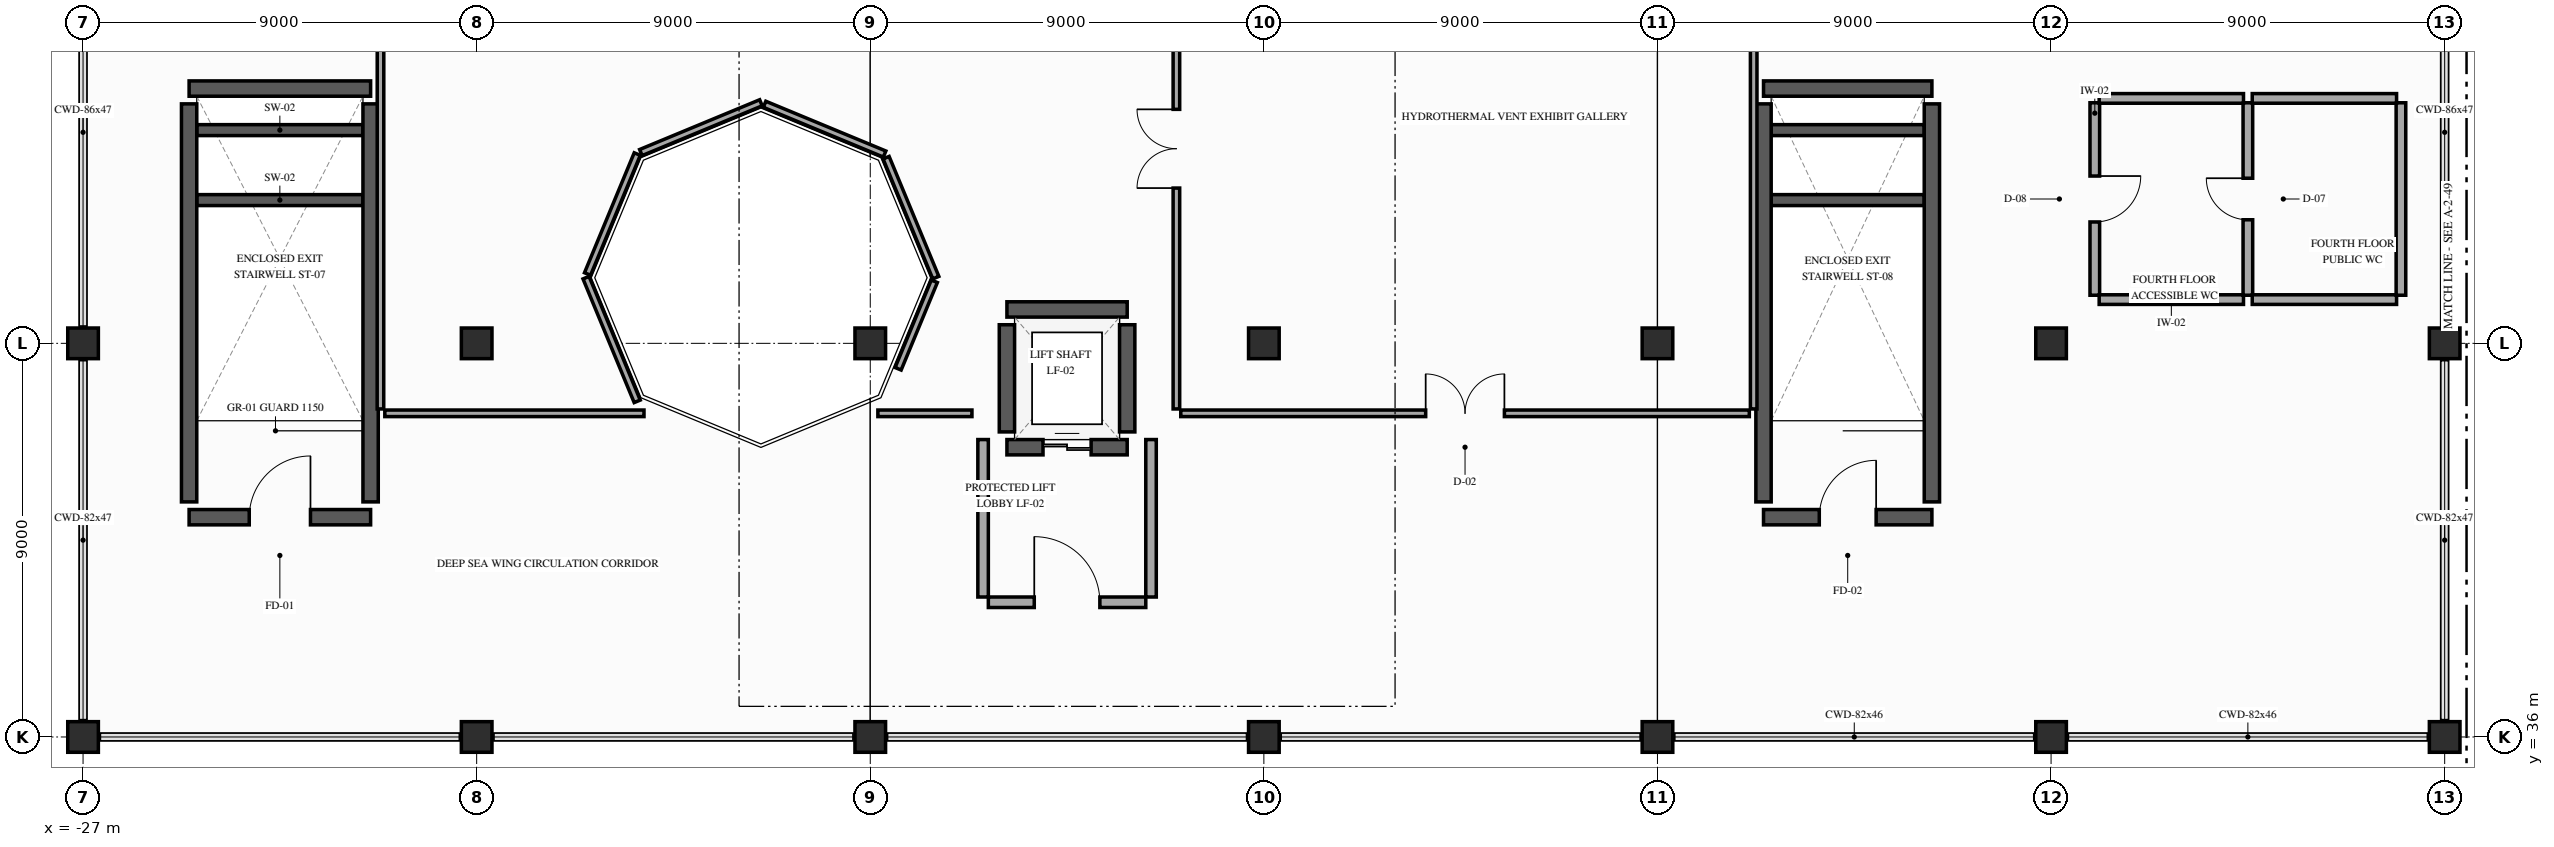
"""IFC4 building model, lengths in metres.
Left out: names, types, materials, properties, quantities, classifications, styles, units other than length and angle.
Written with IfcOpenShell. Run it as: python <this file> out.ifc"""

import sys

from ifc_helpers import new_model, si_unit, direction, frame, frame_2d, origin, origin_2d, place, context, subcontext, project, spatial, rectangle, extrude, element, fill, save


model = new_model("IFC4")
c1 = context("Model", 3, precision=1e-05, world=origin(), true_north=direction((0.0, 1.0)))
c2 = subcontext(c1, "Body", "Model", "MODEL_VIEW")
j1 = project(units=[si_unit("LENGTHUNIT", "METRE"), si_unit("PLANEANGLEUNIT", "RADIAN")], contexts=[c1])
p1 = place(None, origin())
s1 = spatial("IfcSite", under=j1, at=p1, CompositionType="ELEMENT")
p2 = place(p1, origin())
s2 = spatial("IfcBuilding", under=s1, at=p2, CompositionType="ELEMENT")
p3 = place(p2, frame((0.0, 0.0, 21.6)))
s3 = spatial("IfcBuildingStorey", under=s2, at=p3, CompositionType="ELEMENT", Elevation=21.6)
for number, where, z_axis, x_axis in (
    (1, (-27.0, 36.0, 0.0), (0.0, 0.0, 1.0), (1.0, 0.0, 0.0)),
    (2, (-27.0, 45.0, 0.0), (0.0, 0.0, 1.0), (1.0, 0.0, 0.0)),
    (3, (-18.0, 36.0, 0.0), (0.0, 0.0, 1.0), (1.0, 0.0, 0.0)),
    (4, (-18.0, 45.0, 0.0), (0.0, 0.0, 1.0), (1.0, 0.0, 0.0)),
    (5, (-9.0, 36.0, 0.0), (0.0, 0.0, 1.0), (1.0, 0.0, 0.0)),
    (6, (-9.0, 45.0, 0.0), (0.0, 0.0, 1.0), (1.0, 0.0, 0.0)),
    (7, (0.0, 36.0, 0.0), (0.0, 0.0, 1.0), (1.0, 0.0, 0.0)),
    (8, (0.0, 45.0, 0.0), (0.0, 0.0, 1.0), (1.0, 0.0, 0.0)),
    (9, (9.0, 36.0, 0.0), (0.0, 0.0, 1.0), (1.0, 0.0, 0.0)),
    (10, (9.0, 45.0, 0.0), (0.0, 0.0, 1.0), (1.0, 0.0, 0.0)),
    (11, (18.0, 36.0, 0.0), (0.0, 0.0, 1.0), (1.0, 0.0, 0.0)),
    (12, (18.0, 45.0, 0.0), (0.0, 0.0, 1.0), (1.0, 0.0, 0.0)),
    (13, (27.0, 36.0, 0.0), (0.0, 0.0, 1.0), (1.0, 0.0, 0.0)),
    (14, (27.0, 45.0, 0.0), (0.0, 0.0, 1.0), (1.0, 0.0, 0.0)),
):
    element("IfcColumn", number, at=place(p3, frame(where, z_axis=z_axis, x_axis=x_axis)), inside=s3, PredefinedType="COLUMN", context=c2, shape_type="SweptSolid", body=[
        extrude(rectangle(XDim=0.7, YDim=0.7, at=origin_2d()), origin(), (0.0, 0.0, 1.0), 5.4),
    ])
for number, where, z_axis, x_axis in (
    (15, (-24.4, 48.275, 0.0), (0.0, 0.0, 1.0), (1.0, 0.0, 0.0)),
    (16, (-24.4, 49.875, 0.0), (0.0, 0.0, 1.0), (1.0, 0.0, 0.0)),
):
    element("IfcWall", number, at=place(p3, frame(where, z_axis=z_axis, x_axis=x_axis)), inside=s3, PredefinedType="SHEAR", context=c2, shape_type="SweptSolid", body=[
        extrude(rectangle(XDim=3.8, YDim=0.25, at=frame_2d((1.9, 0.0))), origin(), (0.0, 0.0, 1.0), 2.5),
    ])
p4 = place(p3, frame((-24.575, 41.025, 0.0), z_axis=(0.0, 0.0, 1.0), x_axis=(1.0, 0.0, 0.0)))
e17 = element("IfcWall", 17, at=p4, inside=s3, PredefinedType="SHEAR", context=c2, shape_type="SweptSolid", body=[
    extrude(rectangle(XDim=4.15, YDim=0.35, at=frame_2d((2.075, 0.0))), origin(), (0.0, 0.0, 1.0), 5.15),
])
p5 = place(p4, frame((1.375, 0.0, 0.0)))
e18 = element("IfcOpeningElement", 18, at=p5, cuts=e17, PredefinedType="OPENING", context=c2, shape_type="SweptSolid", body=[
    extrude(rectangle(XDim=1.4, YDim=2.2, at=frame_2d((0.7, 1.1))), frame((0.0, 0.185, 0.0), z_axis=(0.0, -1.0, 0.0), x_axis=(1.0, 0.0, 0.0)), (0.0, 0.0, 1.0), 0.37),
])
p6 = place(p3, frame((-24.575, 50.825, 0.0), z_axis=(0.0, 0.0, 1.0), x_axis=(1.0, 0.0, 0.0)))
e19 = element("IfcWall", 19, at=p6, inside=s3, PredefinedType="SHEAR", context=c2, shape_type="SweptSolid", body=[
    extrude(rectangle(XDim=4.15, YDim=0.35, at=frame_2d((2.075, 0.0))), origin(), (0.0, 0.0, 1.0), 5.15),
])
for number, where, z_axis, x_axis in (
    (20, (-24.575, 41.375, 0.0), (0.0, 0.0, 1.0), (0.0, 1.0, 0.0)),
    (21, (-20.425, 41.375, 0.0), (0.0, 0.0, 1.0), (0.0, 1.0, 0.0)),
):
    element("IfcWall", number, at=place(p3, frame(where, z_axis=z_axis, x_axis=x_axis)), inside=s3, PredefinedType="SHEAR", context=c2, shape_type="SweptSolid", body=[
        extrude(rectangle(XDim=9.1, YDim=0.35, at=frame_2d((4.55, 0.0))), origin(), (0.0, 0.0, 1.0), 5.15),
    ])
for number, where, z_axis, x_axis in (
    (22, (11.6, 48.275, 0.0), (0.0, 0.0, 1.0), (1.0, 0.0, 0.0)),
    (23, (11.6, 49.875, 0.0), (0.0, 0.0, 1.0), (1.0, 0.0, 0.0)),
):
    element("IfcWall", number, at=place(p3, frame(where, z_axis=z_axis, x_axis=x_axis)), inside=s3, PredefinedType="SHEAR", context=c2, shape_type="SweptSolid", body=[
        extrude(rectangle(XDim=3.5, YDim=0.25, at=frame_2d((1.75, 0.0))), origin(), (0.0, 0.0, 1.0), 2.5),
    ])
p7 = place(p3, frame((11.425, 41.025, 0.0), z_axis=(0.0, 0.0, 1.0), x_axis=(1.0, 0.0, 0.0)))
e24 = element("IfcWall", 24, at=p7, inside=s3, PredefinedType="SHEAR", context=c2, shape_type="SweptSolid", body=[
    extrude(rectangle(XDim=3.85, YDim=0.35, at=frame_2d((1.925, 0.0))), origin(), (0.0, 0.0, 1.0), 5.15),
])
p8 = place(p7, frame((1.275, 0.0, 0.0)))
e25 = element("IfcOpeningElement", 25, at=p8, cuts=e24, PredefinedType="OPENING", context=c2, shape_type="SweptSolid", body=[
    extrude(rectangle(XDim=1.3, YDim=2.2, at=frame_2d((0.65, 1.1))), frame((0.0, 0.185, 0.0), z_axis=(0.0, -1.0, 0.0), x_axis=(1.0, 0.0, 0.0)), (0.0, 0.0, 1.0), 0.37),
])
p9 = place(p3, frame((11.425, 50.825, 0.0), z_axis=(0.0, 0.0, 1.0), x_axis=(1.0, 0.0, 0.0)))
e26 = element("IfcWall", 26, at=p9, inside=s3, PredefinedType="SHEAR", context=c2, shape_type="SweptSolid", body=[
    extrude(rectangle(XDim=3.85, YDim=0.35, at=frame_2d((1.925, 0.0))), origin(), (0.0, 0.0, 1.0), 5.15),
])
for number, where, z_axis, x_axis in (
    (27, (11.425, 41.375, 0.0), (0.0, 0.0, 1.0), (0.0, 1.0, 0.0)),
    (28, (15.275, 41.375, 0.0), (0.0, 0.0, 1.0), (0.0, 1.0, 0.0)),
):
    element("IfcWall", number, at=place(p3, frame(where, z_axis=z_axis, x_axis=x_axis)), inside=s3, PredefinedType="SHEAR", context=c2, shape_type="SweptSolid", body=[
        extrude(rectangle(XDim=9.1, YDim=0.35, at=frame_2d((4.55, 0.0))), origin(), (0.0, 0.0, 1.0), 5.15),
    ])
p10 = place(p3, frame((-5.875, 42.625, 0.0), z_axis=(0.0, 0.0, 1.0), x_axis=(1.0, 0.0, 0.0)))
e29 = element("IfcWall", 29, at=p10, inside=s3, PredefinedType="SHEAR", context=c2, shape_type="SweptSolid", body=[
    extrude(rectangle(XDim=2.75, YDim=0.35, at=frame_2d((1.375, 0.0))), origin(), (0.0, 0.0, 1.0), 5.15),
])
p11 = place(p10, frame((0.825, 0.0, 0.0)))
e30 = element("IfcOpeningElement", 30, at=p11, cuts=e29, PredefinedType="OPENING", context=c2, shape_type="SweptSolid", body=[
    extrude(rectangle(XDim=1.1, YDim=2.2, at=frame_2d((0.55, 1.1))), frame((0.0, 0.185, 0.0), z_axis=(0.0, -1.0, 0.0), x_axis=(1.0, 0.0, 0.0)), (0.0, 0.0, 1.0), 0.37),
])
p12 = place(p3, frame((-3.125, 45.775, 0.0), z_axis=(0.0, 0.0, 1.0), x_axis=(-1.0, 0.0, 0.0)))
e31 = element("IfcWall", 31, at=p12, inside=s3, PredefinedType="SHEAR", context=c2, shape_type="SweptSolid", body=[
    extrude(rectangle(XDim=2.75, YDim=0.35, at=frame_2d((1.375, 0.0))), origin(), (0.0, 0.0, 1.0), 5.15),
])
for number, where, z_axis, x_axis in (
    (32, (-5.875, 42.975, 0.0), (0.0, 0.0, 1.0), (0.0, 1.0, 0.0)),
    (33, (-3.125, 42.975, 0.0), (0.0, 0.0, 1.0), (0.0, 1.0, 0.0)),
):
    element("IfcWall", number, at=place(p3, frame(where, z_axis=z_axis, x_axis=x_axis)), inside=s3, PredefinedType="SHEAR", context=c2, shape_type="SweptSolid", body=[
        extrude(rectangle(XDim=2.45, YDim=0.35, at=frame_2d((1.225, 0.0))), origin(), (0.0, 0.0, 1.0), 5.15),
    ])
p13 = place(p3, frame((-6.3, 39.08, 0.0), z_axis=(0.0, 0.0, 1.0), x_axis=(1.0, 0.0, 0.0)))
e34 = element("IfcWall", 34, at=p13, inside=s3, PredefinedType="PARTITIONING", context=c2, shape_type="SweptSolid", body=[
    extrude(rectangle(XDim=3.6, YDim=0.24, at=frame_2d((1.8, 0.0))), origin(), (0.0, 0.0, 1.0), 5.1),
])
p14 = place(p13, frame((1.05, 0.0, 0.0)))
e35 = element("IfcOpeningElement", 35, at=p14, cuts=e34, PredefinedType="OPENING", context=c2, shape_type="SweptSolid", body=[
    extrude(rectangle(XDim=1.5, YDim=2.2, at=frame_2d((0.75, 1.1))), frame((0.0, 0.13, 0.0), z_axis=(0.0, -1.0, 0.0), x_axis=(1.0, 0.0, 0.0)), (0.0, 0.0, 1.0), 0.26),
])
for number, where, z_axis, x_axis in (
    (36, (-6.42, 39.2, 0.0), (0.0, 0.0, 1.0), (0.0, 1.0, 0.0)),
    (37, (-2.58, 39.2, 0.0), (0.0, 0.0, 1.0), (0.0, 1.0, 0.0)),
):
    element("IfcWall", number, at=place(p3, frame(where, z_axis=z_axis, x_axis=x_axis)), inside=s3, PredefinedType="PARTITIONING", context=c2, shape_type="SweptSolid", body=[
        extrude(rectangle(XDim=3.6, YDim=0.24, at=frame_2d((1.8, 0.0))), origin(), (0.0, 0.0, 1.0), 5.1),
    ])
p15 = place(p3, frame((19.0, 50.5, 0.0), z_axis=(0.0, 0.0, 1.0), x_axis=(0.0, -1.0, 0.0)))
e38 = element("IfcWall", 38, at=p15, inside=s3, PredefinedType="PLUMBINGWALL", context=c2, shape_type="SweptSolid", body=[
    extrude(rectangle(XDim=4.4, YDim=0.22, at=frame_2d((2.2, 0.0))), origin(), (0.0, 0.0, 1.0), 5.05),
])
p16 = place(p15, frame((1.675, 0.0, 0.0)))
e39 = element("IfcOpeningElement", 39, at=p16, cuts=e38, PredefinedType="OPENING", context=c2, shape_type="SweptSolid", body=[
    extrude(rectangle(XDim=1.05, YDim=2.15, at=frame_2d((0.525, 1.075))), frame((0.0, 0.12, 0.0), z_axis=(0.0, -1.0, 0.0), x_axis=(1.0, 0.0, 0.0)), (0.0, 0.0, 1.0), 0.24),
])
p17 = place(p3, frame((19.1, 46.0, 0.0), z_axis=(0.0, 0.0, 1.0), x_axis=(1.0, 0.0, 0.0)))
e40 = element("IfcWall", 40, at=p17, inside=s3, PredefinedType="PLUMBINGWALL", context=c2, shape_type="SweptSolid", body=[
    extrude(rectangle(XDim=3.3, YDim=0.22, at=frame_2d((1.65, 0.0))), origin(), (0.0, 0.0, 1.0), 5.05),
])
p18 = place(p3, frame((22.5, 46.1, 0.0), z_axis=(0.0, 0.0, 1.0), x_axis=(0.0, 1.0, 0.0)))
e41 = element("IfcWall", 41, at=p18, inside=s3, PredefinedType="PLUMBINGWALL", context=c2, shape_type="SweptSolid", body=[
    extrude(rectangle(XDim=4.4, YDim=0.22, at=frame_2d((2.2, 0.0))), origin(), (0.0, 0.0, 1.0), 5.05),
])
p19 = place(p18, frame((1.725, 0.0, 0.0)))
e42 = element("IfcOpeningElement", 42, at=p19, cuts=e41, PredefinedType="OPENING", context=c2, shape_type="SweptSolid", body=[
    extrude(rectangle(XDim=0.95, YDim=2.15, at=frame_2d((0.475, 1.075))), frame((0.0, 0.12, 0.0), z_axis=(0.0, -1.0, 0.0), x_axis=(1.0, 0.0, 0.0)), (0.0, 0.0, 1.0), 0.24),
])
for number, where, z_axis, x_axis in (
    (43, (22.4, 50.6, 0.0), (0.0, 0.0, 1.0), (-1.0, 0.0, 0.0)),
    (44, (22.6, 46.0, 0.0), (0.0, 0.0, 1.0), (1.0, 0.0, 0.0)),
):
    element("IfcWall", number, at=place(p3, frame(where, z_axis=z_axis, x_axis=x_axis)), inside=s3, PredefinedType="PLUMBINGWALL", context=c2, shape_type="SweptSolid", body=[
        extrude(rectangle(XDim=3.3, YDim=0.22, at=frame_2d((1.65, 0.0))), origin(), (0.0, 0.0, 1.0), 5.05),
    ])
p20 = place(p3, frame((26.0, 46.1, 0.0), z_axis=(0.0, 0.0, 1.0), x_axis=(0.0, 1.0, 0.0)))
e45 = element("IfcWall", 45, at=p20, inside=s3, PredefinedType="PLUMBINGWALL", context=c2, shape_type="SweptSolid", body=[
    extrude(rectangle(XDim=4.4, YDim=0.22, at=frame_2d((2.2, 0.0))), origin(), (0.0, 0.0, 1.0), 5.05),
])
p21 = place(p3, frame((25.9, 50.6, 0.0), z_axis=(0.0, 0.0, 1.0), x_axis=(-1.0, 0.0, 0.0)))
e46 = element("IfcWall", 46, at=p21, inside=s3, PredefinedType="PLUMBINGWALL", context=c2, shape_type="SweptSolid", body=[
    extrude(rectangle(XDim=3.3, YDim=0.22, at=frame_2d((1.65, 0.0))), origin(), (0.0, 0.0, 1.0), 5.05),
])
p22 = place(p3, frame((-20.198, 53.62, 0.0), z_axis=(0.0, 0.0, 1.0), x_axis=(-0.000192994303, -0.999999981377, 0.0)))
e47 = element("IfcWall", 47, at=p22, inside=s3, PredefinedType="PARTITIONING", context=c2, shape_type="SweptSolid", body=[
    extrude(rectangle(XDim=10.12, YDim=0.15, at=frame_2d((5.06, 0.0))), origin(), (0.0, 0.0, 1.0), 5.05),
])
p23 = place(p3, frame((-20.1, 43.4, 0.0), z_axis=(0.0, 0.0, 1.0), x_axis=(1.0, 0.0, 0.0)))
e48 = element("IfcWall", 48, at=p23, inside=s3, PredefinedType="PARTITIONING", context=c2, shape_type="SweptSolid", body=[
    extrude(rectangle(XDim=5.926, YDim=0.15, at=frame_2d((2.963, 0.0))), origin(), (0.0, 0.0, 1.0), 4.685),
])
p24 = place(p3, frame((-14.329, 43.674, 0.0), z_axis=(0.0, 0.0, 1.0), x_axis=(-0.382286027274, 0.924044042971, 0.0)))
e49 = element("IfcWall", 49, at=p24, inside=s3, PredefinedType="PARTITIONING", context=c2, shape_type="SweptSolid", body=[
    extrude(rectangle(XDim=3.06, YDim=0.15, at=frame_2d((1.53, 0.0))), origin(), (0.0, 0.0, 1.0), 4.635),
])
p25 = place(p3, frame((-15.465, 46.585, 0.0), z_axis=(0.0, 0.0, 1.0), x_axis=(0.382985932097, 0.923754174992, 0.0)))
e50 = element("IfcWall", 50, at=p25, inside=s3, PredefinedType="PARTITIONING", context=c2, shape_type="SweptSolid", body=[
    extrude(rectangle(XDim=2.969, YDim=0.15, at=frame_2d((1.485, 0.0))), origin(), (0.0, 0.0, 1.0), 5.05),
])
p26 = place(p3, frame((-14.245, 49.362, 0.0), z_axis=(0.0, 0.0, 1.0), x_axis=(0.923775431697, 0.382934657341, 0.0)))
e51 = element("IfcWall", 51, at=p26, inside=s3, PredefinedType="PARTITIONING", context=c2, shape_type="SweptSolid", body=[
    extrude(rectangle(XDim=2.972, YDim=0.15, at=frame_2d((1.486, 0.0))), origin(), (0.0, 0.0, 1.0), 5.05),
])
p27 = place(p3, frame((-11.417, 50.466, 0.0), z_axis=(0.0, 0.0, 1.0), x_axis=(0.923734314356, -0.383033832031, 0.0)))
e52 = element("IfcWall", 52, at=p27, inside=s3, PredefinedType="PARTITIONING", context=c2, shape_type="SweptSolid", body=[
    extrude(rectangle(XDim=2.971, YDim=0.15, at=frame_2d((1.486, 0.0))), origin(), (0.0, 0.0, 1.0), 4.685),
])
p28 = place(p3, frame((-8.638, 49.245, 0.0), z_axis=(0.0, 0.0, 1.0), x_axis=(0.382886684653, -0.923795316461, 0.0)))
e53 = element("IfcWall", 53, at=p28, inside=s3, PredefinedType="PARTITIONING", context=c2, shape_type="SweptSolid", body=[
    extrude(rectangle(XDim=2.969, YDim=0.15, at=frame_2d((1.485, 0.0))), origin(), (0.0, 0.0, 1.0), 4.685),
])
p29 = place(p3, frame((-7.535, 46.419, 0.0), z_axis=(0.0, 0.0, 1.0), x_axis=(-0.382404898799, -0.923994855708, 0.0)))
e54 = element("IfcWall", 54, at=p29, inside=s3, PredefinedType="PARTITIONING", context=c2, shape_type="SweptSolid", body=[
    extrude(rectangle(XDim=2.166, YDim=0.15, at=frame_2d((1.083, 0.0))), origin(), (0.0, 0.0, 1.0), 5.05),
])
p30 = place(p3, frame((-8.826, 43.4, 0.0), z_axis=(0.0, 0.0, 1.0), x_axis=(1.0, 0.0, 0.0)))
e55 = element("IfcWall", 55, at=p30, inside=s3, PredefinedType="PARTITIONING", context=c2, shape_type="SweptSolid", body=[
    extrude(rectangle(XDim=2.151, YDim=0.15, at=frame_2d((1.075, 0.0))), origin(), (0.0, 0.0, 1.0), 4.685),
])
p31 = place(p3, frame((-2.0, 43.5, 0.0), z_axis=(0.0, 0.0, 1.0), x_axis=(0.0, 1.0, 0.0)))
e56 = element("IfcWall", 56, at=p31, inside=s3, PredefinedType="PARTITIONING", context=c2, shape_type="SweptSolid", body=[
    extrude(rectangle(XDim=11.9, YDim=0.15, at=frame_2d((5.95, 0.0))), origin(), (0.0, 0.0, 1.0), 4.635),
])
p32 = place(p31, frame((5.05, 0.0, 0.0)))
e57 = element("IfcOpeningElement", 57, at=p32, cuts=e56, PredefinedType="OPENING", context=c2, shape_type="SweptSolid", body=[
    extrude(rectangle(XDim=1.8, YDim=2.3, at=frame_2d((0.9, 1.15))), frame((0.0, 0.085, 0.0), z_axis=(0.0, -1.0, 0.0), x_axis=(1.0, 0.0, 0.0)), (0.0, 0.0, 1.0), 0.17),
])
p33 = place(p3, frame((-1.9, 43.4, 0.0), z_axis=(0.0, 0.0, 1.0), x_axis=(1.0, 0.0, 0.0)))
e58 = element("IfcWall", 58, at=p33, inside=s3, PredefinedType="PARTITIONING", context=c2, shape_type="SweptSolid", body=[
    extrude(rectangle(XDim=13.0, YDim=0.15, at=frame_2d((6.5, 0.0))), origin(), (0.0, 0.0, 1.0), 4.685),
])
p34 = place(p33, frame((5.6, 0.0, 0.0)))
e59 = element("IfcOpeningElement", 59, at=p34, cuts=e58, PredefinedType="OPENING", context=c2, shape_type="SweptSolid", body=[
    extrude(rectangle(XDim=1.8, YDim=2.3, at=frame_2d((0.9, 1.15))), frame((0.0, 0.085, 0.0), z_axis=(0.0, -1.0, 0.0), x_axis=(1.0, 0.0, 0.0)), (0.0, 0.0, 1.0), 0.17),
])
p35 = place(p3, frame((11.2, 43.5, 0.0), z_axis=(0.0, 0.0, 1.0), x_axis=(0.0, 1.0, 0.0)))
e60 = element("IfcWall", 60, at=p35, inside=s3, PredefinedType="PARTITIONING", context=c2, shape_type="SweptSolid", body=[
    extrude(rectangle(XDim=11.9, YDim=0.15, at=frame_2d((5.95, 0.0))), origin(), (0.0, 0.0, 1.0), 4.635),
])
p36 = place(p5, origin())
e61 = element("IfcDoor", 61, at=p36, inside=s3, OperationType="SINGLE_SWING_RIGHT", PredefinedType="DOOR", context=c2, shape_type="SweptSolid", body=[
    extrude(rectangle(XDim=1.4, YDim=2.2, at=frame_2d((0.7, 1.1))), frame((0.0, 0.025, 0.0), z_axis=(0.0, -1.0, 0.0), x_axis=(1.0, 0.0, 0.0)), (0.0, 0.0, 1.0), 0.05),
])
fill(e18, e61)
p37 = place(p8, origin())
e62 = element("IfcDoor", 62, at=p37, inside=s3, OperationType="SINGLE_SWING_RIGHT", PredefinedType="DOOR", context=c2, shape_type="SweptSolid", body=[
    extrude(rectangle(XDim=1.3, YDim=2.2, at=frame_2d((0.65, 1.1))), frame((0.0, 0.025, 0.0), z_axis=(0.0, -1.0, 0.0), x_axis=(1.0, 0.0, 0.0)), (0.0, 0.0, 1.0), 0.05),
])
fill(e25, e62)
p38 = place(p11, origin())
e63 = element("IfcDoor", 63, at=p38, inside=s3, OperationType="DOUBLE_DOOR_SLIDING", PredefinedType="DOOR", context=c2, shape_type="SweptSolid", body=[
    extrude(rectangle(XDim=1.1, YDim=2.2, at=frame_2d((0.55, 1.1))), frame((0.0, 0.025, 0.0), z_axis=(0.0, -1.0, 0.0), x_axis=(1.0, 0.0, 0.0)), (0.0, 0.0, 1.0), 0.05),
])
fill(e30, e63)
p39 = place(p14, origin())
e64 = element("IfcDoor", 64, at=p39, inside=s3, OperationType="SINGLE_SWING_LEFT", PredefinedType="DOOR", context=c2, shape_type="SweptSolid", body=[
    extrude(rectangle(XDim=1.5, YDim=2.2, at=frame_2d((0.75, 1.1))), frame((0.0, 0.025, 0.0), z_axis=(0.0, -1.0, 0.0), x_axis=(1.0, 0.0, 0.0)), (0.0, 0.0, 1.0), 0.05),
])
fill(e35, e64)
p40 = place(p16, origin())
e65 = element("IfcDoor", 65, at=p40, inside=s3, OperationType="SINGLE_SWING_LEFT", PredefinedType="DOOR", context=c2, shape_type="SweptSolid", body=[
    extrude(rectangle(XDim=1.05, YDim=2.15, at=frame_2d((0.525, 1.075))), frame((0.0, 0.025, 0.0), z_axis=(0.0, -1.0, 0.0), x_axis=(1.0, 0.0, 0.0)), (0.0, 0.0, 1.0), 0.05),
])
fill(e39, e65)
p41 = place(p19, origin())
e66 = element("IfcDoor", 66, at=p41, inside=s3, OperationType="SINGLE_SWING_RIGHT", PredefinedType="DOOR", context=c2, shape_type="SweptSolid", body=[
    extrude(rectangle(XDim=0.95, YDim=2.15, at=frame_2d((0.475, 1.075))), frame((0.0, 0.025, 0.0), z_axis=(0.0, -1.0, 0.0), x_axis=(1.0, 0.0, 0.0)), (0.0, 0.0, 1.0), 0.05),
])
fill(e42, e66)
p42 = place(p32, origin())
e67 = element("IfcDoor", 67, at=p42, inside=s3, OperationType="DOUBLE_DOOR_SINGLE_SWING", PredefinedType="DOOR", context=c2, shape_type="SweptSolid", body=[
    extrude(rectangle(XDim=1.8, YDim=2.3, at=frame_2d((0.9, 1.15))), frame((0.0, 0.025, 0.0), z_axis=(0.0, -1.0, 0.0), x_axis=(1.0, 0.0, 0.0)), (0.0, 0.0, 1.0), 0.05),
])
fill(e57, e67)
p43 = place(p34, origin())
e68 = element("IfcDoor", 68, at=p43, inside=s3, OperationType="DOUBLE_DOOR_SINGLE_SWING", PredefinedType="DOOR", context=c2, shape_type="SweptSolid", body=[
    extrude(rectangle(XDim=1.8, YDim=2.3, at=frame_2d((0.9, 1.15))), frame((0.0, 0.025, 0.0), z_axis=(0.0, -1.0, 0.0), x_axis=(1.0, 0.0, 0.0)), (0.0, 0.0, 1.0), 0.05),
])
fill(e59, e68)
save(model, sys.argv[1])
